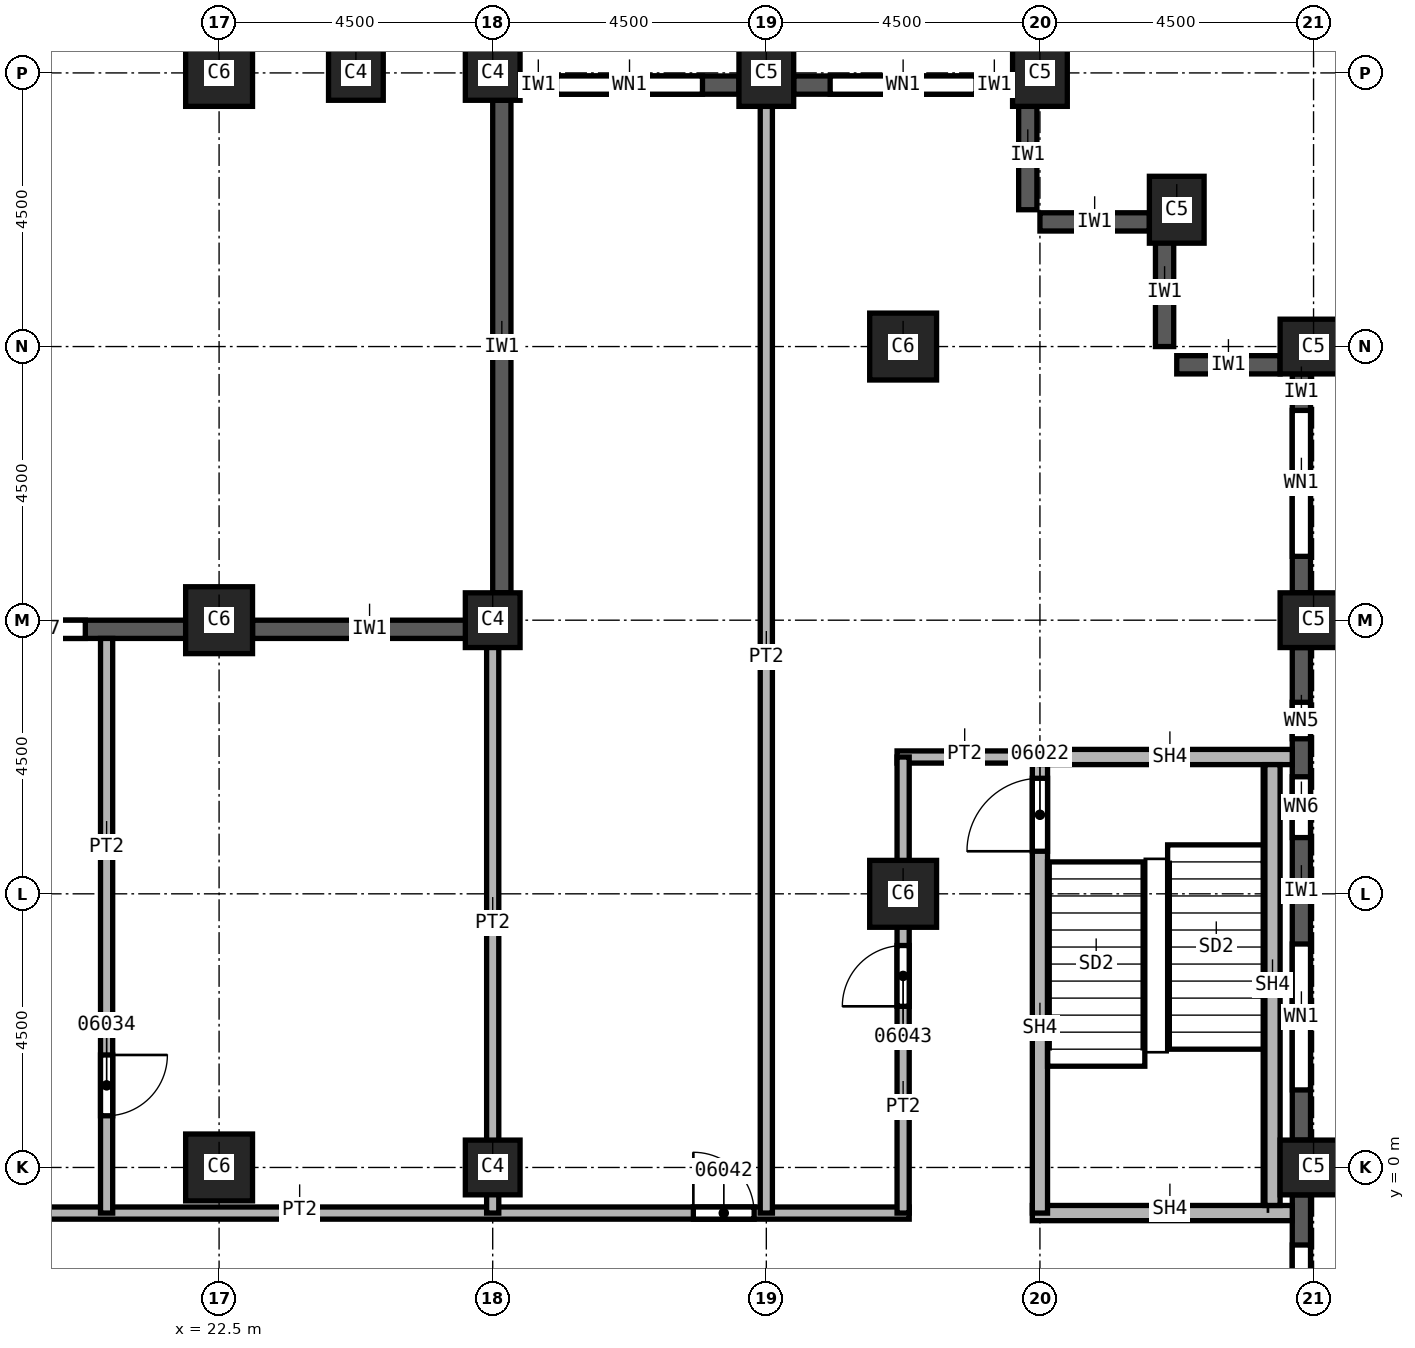
"""IFC4 building model, lengths in metres.
Left out: names, types, materials, properties, quantities, classifications, styles, units other than length and angle.
Written with IfcOpenShell. Run it as: python <this file> out.ifc"""

import sys

from ifc_helpers import new_model, si_unit, direction, frame, frame_2d, origin, origin_2d, place, context, subcontext, project, spatial, rectangle, extrude, element, fill, save


model = new_model("IFC4")
c1 = context("Model", 3, precision=1e-05, world=origin(), true_north=direction((0.0, 1.0)))
c2 = subcontext(c1, "Body", "Model", "MODEL_VIEW")
j1 = project(units=[si_unit("LENGTHUNIT", "METRE"), si_unit("PLANEANGLEUNIT", "RADIAN")], contexts=[c1])
p1 = place(None, origin())
s1 = spatial("IfcSite", under=j1, at=p1, CompositionType="ELEMENT")
p2 = place(p1, origin())
s2 = spatial("IfcBuilding", under=s1, at=p2, CompositionType="ELEMENT")
p3 = place(p2, frame((0.0, 0.0, 126.0)))
s3 = spatial("IfcBuildingStorey", under=s2, at=p3, CompositionType="ELEMENT", Elevation=126.0)
for number, where, z_axis, x_axis in (
    (1, (40.5, 0.0, 0.0), (0.0, 0.0, 1.0), (0.0, 1.0, 0.0)),
    (2, (40.5, 9.0, 0.0), (0.0, 0.0, 1.0), (0.0, 1.0, 0.0)),
    (3, (40.5, 13.5, 0.0), (0.0, 0.0, 1.0), (0.0, 1.0, 0.0)),
    (4, (38.25, 15.75, 0.0), (0.0, 0.0, 1.0), (1.0, 0.0, 0.0)),
    (5, (31.5, 18.0, 0.0), (0.0, 0.0, 1.0), (1.0, 0.0, 0.0)),
    (6, (36.0, 18.0, 0.0), (0.0, 0.0, 1.0), (1.0, 0.0, 0.0)),
):
    element("IfcColumn", number, at=place(p3, frame(where, z_axis=z_axis, x_axis=x_axis)), inside=s3, PredefinedType="COLUMN", context=c2, shape_type="SweptSolid", body=[
        extrude(rectangle(XDim=0.9, YDim=1.1, at=origin_2d()), origin(), (0.0, 0.0, 1.0), 3.7),
    ])
for number, where, z_axis, x_axis in (
    (7, (33.75, 4.5, 0.0), (0.0, 0.0, 1.0), (1.0, 0.0, 0.0)),
    (8, (33.75, 13.5, 0.0), (0.0, 0.0, 1.0), (1.0, 0.0, 0.0)),
    (9, (22.5, 0.0, 0.0), (0.0, 0.0, 1.0), (1.0, 0.0, 0.0)),
    (10, (22.5, 9.0, 0.0), (0.0, 0.0, 1.0), (1.0, 0.0, 0.0)),
    (11, (22.5, 18.0, 0.0), (0.0, 0.0, 1.0), (1.0, 0.0, 0.0)),
):
    element("IfcColumn", number, at=place(p3, frame(where, z_axis=z_axis, x_axis=x_axis)), inside=s3, PredefinedType="COLUMN", context=c2, shape_type="SweptSolid", body=[
        extrude(rectangle(XDim=1.1, YDim=1.1, at=origin_2d()), origin(), (0.0, 0.0, 1.0), 3.7),
    ])
for number, where, z_axis, x_axis in (
    (12, (27.0, 0.0, 0.0), (0.0, 0.0, 1.0), (1.0, 0.0, 0.0)),
    (13, (27.0, 9.0, 0.0), (0.0, 0.0, 1.0), (1.0, 0.0, 0.0)),
    (14, (27.0, 18.0, 0.0), (0.0, 0.0, 1.0), (1.0, 0.0, 0.0)),
    (15, (24.75, 18.0, 0.0), (0.0, 0.0, 1.0), (1.0, 0.0, 0.0)),
):
    element("IfcColumn", number, at=place(p3, frame(where, z_axis=z_axis, x_axis=x_axis)), inside=s3, PredefinedType="COLUMN", context=c2, shape_type="SweptSolid", body=[
        extrude(rectangle(XDim=0.9, YDim=0.9, at=origin_2d()), origin(), (0.0, 0.0, 1.0), 3.7),
    ])
p4 = place(p3, frame((39.95, 13.2, 0.0), z_axis=(0.0, 0.0, 1.0), x_axis=(-1.0, 0.0, 0.0)))
e16 = element("IfcWall", 16, at=p4, inside=s3, PredefinedType="SOLIDWALL", context=c2, shape_type="SweptSolid", body=[
    extrude(rectangle(XDim=1.7, YDim=0.3, at=frame_2d((0.85, 0.0))), origin(), (0.0, 0.0, 1.0), 3.1),
])
for number, where, z_axis, x_axis in (
    (17, (38.05, 15.3, 0.0), (0.0, 0.0, 1.0), (0.0, -1.0, 0.0)),
    (18, (37.8, 15.55, 0.0), (0.0, 0.0, 1.0), (-1.0, 0.0, 0.0)),
    (19, (35.8, 17.55, 0.0), (0.0, 0.0, 1.0), (0.0, -1.0, 0.0)),
):
    element("IfcWall", number, at=place(p3, frame(where, z_axis=z_axis, x_axis=x_axis)), inside=s3, PredefinedType="SOLIDWALL", context=c2, shape_type="SweptSolid", body=[
        extrude(rectangle(XDim=1.8, YDim=0.3, at=frame_2d((0.9, 0.0))), origin(), (0.0, 0.0, 1.0), 3.1),
    ])
p5 = place(p3, frame((40.3, -8.55, 0.0), z_axis=(0.0, 0.0, 1.0), x_axis=(0.0, 1.0, 0.0)))
e20 = element("IfcWall", 20, at=p5, inside=s3, PredefinedType="SOLIDWALL", context=c2, shape_type="SweptSolid", body=[
    extrude(rectangle(XDim=8.1, YDim=0.3, at=frame_2d((4.05, 0.0))), origin(), (0.0, 0.0, 1.0), 3.1),
])
p6 = place(p5, frame((0.825, 0.0, 0.8)))
e21 = element("IfcOpeningElement", 21, at=p6, cuts=e20, PredefinedType="OPENING", context=c2, shape_type="SweptSolid", body=[
    extrude(rectangle(XDim=2.4, YDim=1.95, at=frame_2d((1.2, 0.975))), frame((0.0, 0.15, 0.0), z_axis=(0.0, -1.0, 0.0), x_axis=(1.0, 0.0, 0.0)), (0.0, 0.0, 1.0), 0.3),
])
p7 = place(p5, frame((4.875, 0.0, 0.8)))
e22 = element("IfcOpeningElement", 22, at=p7, cuts=e20, PredefinedType="OPENING", context=c2, shape_type="SweptSolid", body=[
    extrude(rectangle(XDim=2.4, YDim=1.95, at=frame_2d((1.2, 0.975))), frame((0.0, 0.15, 0.0), z_axis=(0.0, -1.0, 0.0), x_axis=(1.0, 0.0, 0.0)), (0.0, 0.0, 1.0), 0.3),
])
p8 = place(p3, frame((40.3, 0.45, 0.0), z_axis=(0.0, 0.0, 1.0), x_axis=(0.0, 1.0, 0.0)))
e23 = element("IfcWall", 23, at=p8, inside=s3, PredefinedType="SOLIDWALL", context=c2, shape_type="SweptSolid", body=[
    extrude(rectangle(XDim=8.1, YDim=0.3, at=frame_2d((4.05, 0.0))), origin(), (0.0, 0.0, 1.0), 3.1),
])
p9 = place(p8, frame((0.825, 0.0, 0.8)))
e24 = element("IfcOpeningElement", 24, at=p9, cuts=e23, PredefinedType="OPENING", context=c2, shape_type="SweptSolid", body=[
    extrude(rectangle(XDim=2.4, YDim=1.95, at=frame_2d((1.2, 0.975))), frame((0.0, 0.15, 0.0), z_axis=(0.0, -1.0, 0.0), x_axis=(1.0, 0.0, 0.0)), (0.0, 0.0, 1.0), 0.3),
])
p10 = place(p8, frame((4.975, 0.0, 0.8)))
e25 = element("IfcOpeningElement", 25, at=p10, cuts=e23, PredefinedType="OPENING", context=c2, shape_type="SweptSolid", body=[
    extrude(rectangle(XDim=1.0, YDim=1.95, at=frame_2d((0.5, 0.975))), frame((0.0, 0.15, 0.0), z_axis=(0.0, -1.0, 0.0), x_axis=(1.0, 0.0, 0.0)), (0.0, 0.0, 1.0), 0.3),
])
p11 = place(p8, frame((6.6, 0.0, 0.8)))
e26 = element("IfcOpeningElement", 26, at=p11, cuts=e23, PredefinedType="OPENING", context=c2, shape_type="SweptSolid", body=[
    extrude(rectangle(XDim=0.6, YDim=1.95, at=frame_2d((0.3, 0.975))), frame((0.0, 0.15, 0.0), z_axis=(0.0, -1.0, 0.0), x_axis=(1.0, 0.0, 0.0)), (0.0, 0.0, 1.0), 0.3),
])
p12 = place(p3, frame((40.3, 9.45, 0.0), z_axis=(0.0, 0.0, 1.0), x_axis=(0.0, 1.0, 0.0)))
e27 = element("IfcWall", 27, at=p12, inside=s3, PredefinedType="SOLIDWALL", context=c2, shape_type="SweptSolid", body=[
    extrude(rectangle(XDim=3.6, YDim=0.3, at=frame_2d((1.8, 0.0))), origin(), (0.0, 0.0, 1.0), 3.1),
])
p13 = place(p12, frame((0.6, 0.0, 0.8)))
e28 = element("IfcOpeningElement", 28, at=p13, cuts=e27, PredefinedType="OPENING", context=c2, shape_type="SweptSolid", body=[
    extrude(rectangle(XDim=2.4, YDim=1.95, at=frame_2d((1.2, 0.975))), frame((0.0, 0.15, 0.0), z_axis=(0.0, -1.0, 0.0), x_axis=(1.0, 0.0, 0.0)), (0.0, 0.0, 1.0), 0.3),
])
p14 = place(p3, frame((35.55, 17.8, 0.0), z_axis=(0.0, 0.0, 1.0), x_axis=(-1.0, 0.0, 0.0)))
e29 = element("IfcWall", 29, at=p14, inside=s3, PredefinedType="SOLIDWALL", context=c2, shape_type="SweptSolid", body=[
    extrude(rectangle(XDim=3.6, YDim=0.3, at=frame_2d((1.8, 0.0))), origin(), (0.0, 0.0, 1.0), 3.1),
])
p15 = place(p14, frame((0.6, 0.0, 0.8)))
e30 = element("IfcOpeningElement", 30, at=p15, cuts=e29, PredefinedType="OPENING", context=c2, shape_type="SweptSolid", body=[
    extrude(rectangle(XDim=2.4, YDim=1.95, at=frame_2d((1.2, 0.975))), frame((0.0, 0.15, 0.0), z_axis=(0.0, -1.0, 0.0), x_axis=(1.0, 0.0, 0.0)), (0.0, 0.0, 1.0), 0.3),
])
p16 = place(p3, frame((31.05, 17.8, 0.0), z_axis=(0.0, 0.0, 1.0), x_axis=(-1.0, 0.0, 0.0)))
e31 = element("IfcWall", 31, at=p16, inside=s3, PredefinedType="SOLIDWALL", context=c2, shape_type="SweptSolid", body=[
    extrude(rectangle(XDim=3.6, YDim=0.3, at=frame_2d((1.8, 0.0))), origin(), (0.0, 0.0, 1.0), 3.1),
])
p17 = place(p16, frame((0.6, 0.0, 0.8)))
e32 = element("IfcOpeningElement", 32, at=p17, cuts=e31, PredefinedType="OPENING", context=c2, shape_type="SweptSolid", body=[
    extrude(rectangle(XDim=2.4, YDim=1.95, at=frame_2d((1.2, 0.975))), frame((0.0, 0.15, 0.0), z_axis=(0.0, -1.0, 0.0), x_axis=(1.0, 0.0, 0.0)), (0.0, 0.0, 1.0), 0.3),
])
p18 = place(p3, frame((21.95, 8.85, 0.0), z_axis=(0.0, 0.0, 1.0), x_axis=(-1.0, 0.0, 0.0)))
e33 = element("IfcWall", 33, at=p18, inside=s3, PredefinedType="SOLIDWALL", context=c2, shape_type="SweptSolid", body=[
    extrude(rectangle(XDim=8.4, YDim=0.3, at=frame_2d((4.2, 0.0))), origin(), (0.0, 0.0, 1.0), 3.1),
])
p19 = place(p18, frame((1.65, 0.0, 0.8)))
e34 = element("IfcOpeningElement", 34, at=p19, cuts=e33, PredefinedType="OPENING", context=c2, shape_type="SweptSolid", body=[
    extrude(rectangle(XDim=1.4, YDim=1.95, at=frame_2d((0.7, 0.975))), frame((0.0, 0.15, 0.0), z_axis=(0.0, -1.0, 0.0), x_axis=(1.0, 0.0, 0.0)), (0.0, 0.0, 1.0), 0.3),
])
p20 = place(p18, frame((4.875, 0.0, 0.8)))
e35 = element("IfcOpeningElement", 35, at=p20, cuts=e33, PredefinedType="OPENING", context=c2, shape_type="SweptSolid", body=[
    extrude(rectangle(XDim=1.4, YDim=1.95, at=frame_2d((0.7, 0.975))), frame((0.0, 0.15, 0.0), z_axis=(0.0, -1.0, 0.0), x_axis=(1.0, 0.0, 0.0)), (0.0, 0.0, 1.0), 0.3),
])
p21 = place(p3, frame((26.95, 8.85, 0.0), z_axis=(0.0, 0.0, 1.0), x_axis=(-1.0, 0.0, 0.0)))
e36 = element("IfcWall", 36, at=p21, inside=s3, PredefinedType="SOLIDWALL", context=c2, shape_type="SweptSolid", body=[
    extrude(rectangle(XDim=3.9, YDim=0.3, at=frame_2d((1.95, 0.0))), origin(), (0.0, 0.0, 1.0), 3.1),
])
p22 = place(p3, frame((15.4, -0.75, 0.0), z_axis=(0.0, 0.0, 1.0), x_axis=(1.0, 0.0, 0.0)))
e37 = element("IfcWall", 37, at=p22, inside=s3, PredefinedType="PARTITIONING", context=c2, shape_type="SweptSolid", body=[
    extrude(rectangle(XDim=18.45, YDim=0.2, at=frame_2d((9.225, 0.0))), origin(), (0.0, 0.0, 1.0), 3.7),
])
p23 = place(p22, frame((14.9, 0.0, 0.0)))
e38 = element("IfcOpeningElement", 38, at=p23, cuts=e37, PredefinedType="OPENING", context=c2, shape_type="SweptSolid", body=[
    extrude(rectangle(XDim=1.0, YDim=2.1, at=frame_2d((0.5, 1.05))), frame((0.0, 0.1, 0.0), z_axis=(0.0, -1.0, 0.0), x_axis=(1.0, 0.0, 0.0)), (0.0, 0.0, 1.0), 0.2),
])
p24 = place(p3, frame((20.65, 8.7, 0.0), z_axis=(0.0, 0.0, 1.0), x_axis=(0.0, -1.0, 0.0)))
e39 = element("IfcWall", 39, at=p24, inside=s3, PredefinedType="PARTITIONING", context=c2, shape_type="SweptSolid", body=[
    extrude(rectangle(XDim=9.45, YDim=0.2, at=frame_2d((4.725, 0.0))), origin(), (0.0, 0.0, 1.0), 3.7),
])
p25 = place(p24, frame((6.85, 0.0, 0.0)))
e40 = element("IfcOpeningElement", 40, at=p25, cuts=e39, PredefinedType="OPENING", context=c2, shape_type="SweptSolid", body=[
    extrude(rectangle(XDim=1.0, YDim=2.1, at=frame_2d((0.5, 1.05))), frame((0.0, 0.1, 0.0), z_axis=(0.0, -1.0, 0.0), x_axis=(1.0, 0.0, 0.0)), (0.0, 0.0, 1.0), 0.2),
])
p26 = place(p3, frame((27.0, 9.0, 0.0), z_axis=(0.0, 0.0, 1.0), x_axis=(0.0, -1.0, 0.0)))
e41 = element("IfcWall", 41, at=p26, inside=s3, PredefinedType="PARTITIONING", context=c2, shape_type="SweptSolid", body=[
    extrude(rectangle(XDim=9.75, YDim=0.2, at=frame_2d((4.875, 0.0))), origin(), (0.0, 0.0, 1.0), 3.7),
])
p27 = place(p3, frame((31.5, 17.45, 0.0), z_axis=(0.0, 0.0, 1.0), x_axis=(0.0, -1.0, 0.0)))
e42 = element("IfcWall", 42, at=p27, inside=s3, PredefinedType="PARTITIONING", context=c2, shape_type="SweptSolid", body=[
    extrude(rectangle(XDim=18.2, YDim=0.2, at=frame_2d((9.1, 0.0))), origin(), (0.0, 0.0, 1.0), 3.7),
])
p28 = place(p3, frame((33.65, 6.75, 0.0), z_axis=(0.0, 0.0, 1.0), x_axis=(1.0, 0.0, 0.0)))
e43 = element("IfcWall", 43, at=p28, inside=s3, PredefinedType="PARTITIONING", context=c2, shape_type="SweptSolid", body=[
    extrude(rectangle(XDim=2.35, YDim=0.2, at=frame_2d((1.175, 0.0))), origin(), (0.0, 0.0, 1.0), 3.7),
])
p29 = place(p3, frame((33.75, -0.75, 0.0), z_axis=(0.0, 0.0, 1.0), x_axis=(0.0, 1.0, 0.0)))
e44 = element("IfcWall", 44, at=p29, inside=s3, PredefinedType="PARTITIONING", context=c2, shape_type="SweptSolid", body=[
    extrude(rectangle(XDim=7.5, YDim=0.2, at=frame_2d((3.75, 0.0))), origin(), (0.0, 0.0, 1.0), 3.7),
])
p30 = place(p29, frame((3.4, 0.0, 0.0)))
e45 = element("IfcOpeningElement", 45, at=p30, cuts=e44, PredefinedType="OPENING", context=c2, shape_type="SweptSolid", body=[
    extrude(rectangle(XDim=1.0, YDim=2.1, at=frame_2d((0.5, 1.05))), frame((0.0, 0.1, 0.0), z_axis=(0.0, -1.0, 0.0), x_axis=(1.0, 0.0, 0.0)), (0.0, 0.0, 1.0), 0.2),
])
p31 = place(p3, frame((35.875, -0.75, 0.0), z_axis=(0.0, 0.0, 1.0), x_axis=(1.0, 0.0, 0.0)))
e46 = element("IfcWall", 46, at=p31, inside=s3, PredefinedType="SOLIDWALL", context=c2, shape_type="SweptSolid", body=[
    extrude(rectangle(XDim=4.275, YDim=0.25, at=frame_2d((2.137, 0.0))), origin(), (0.0, 0.0, 1.0), 3.7),
])
p32 = place(p3, frame((36.0, -0.75, 0.0), z_axis=(0.0, 0.0, 1.0), x_axis=(0.0, 1.0, 0.0)))
e47 = element("IfcWall", 47, at=p32, inside=s3, PredefinedType="SOLIDWALL", context=c2, shape_type="SweptSolid", body=[
    extrude(rectangle(XDim=7.625, YDim=0.25, at=frame_2d((3.812, 0.0))), origin(), (0.0, 0.0, 1.0), 3.7),
])
p33 = place(p32, frame((5.95, 0.0, 0.0)))
e48 = element("IfcOpeningElement", 48, at=p33, cuts=e47, PredefinedType="OPENING", context=c2, shape_type="SweptSolid", body=[
    extrude(rectangle(XDim=1.2, YDim=2.1, at=frame_2d((0.6, 1.05))), frame((0.0, 0.125, 0.0), z_axis=(0.0, -1.0, 0.0), x_axis=(1.0, 0.0, 0.0)), (0.0, 0.0, 1.0), 0.25),
])
p34 = place(p3, frame((36.0, 6.75, 0.0), z_axis=(0.0, 0.0, 1.0), x_axis=(1.0, 0.0, 0.0)))
e49 = element("IfcWall", 49, at=p34, inside=s3, PredefinedType="SOLIDWALL", context=c2, shape_type="SweptSolid", body=[
    extrude(rectangle(XDim=4.15, YDim=0.25, at=frame_2d((2.075, 0.0))), origin(), (0.0, 0.0, 1.0), 3.7),
])
p35 = place(p3, frame((39.825, -0.625, 0.0), z_axis=(0.0, 0.0, 1.0), x_axis=(0.0, 1.0, 0.0)))
e50 = element("IfcWall", 50, at=p35, inside=s3, PredefinedType="SOLIDWALL", context=c2, shape_type="SweptSolid", body=[
    extrude(rectangle(XDim=7.25, YDim=0.25, at=frame_2d((3.625, 0.0))), origin(), (0.0, 0.0, 1.0), 3.7),
])
p36 = place(p3, frame((27.15, 9.45, 0.0), z_axis=(0.0, 0.0, 1.0), x_axis=(0.0, 1.0, 0.0)))
e51 = element("IfcWall", 51, at=p36, inside=s3, PredefinedType="SOLIDWALL", context=c2, shape_type="SweptSolid", body=[
    extrude(rectangle(XDim=8.1, YDim=0.3, at=frame_2d((4.05, 0.0))), origin(), (0.0, 0.0, 1.0), 3.1),
])
p37 = place(p7, origin())
e52 = element("IfcWindow", 52, at=p37, inside=s3, PartitioningType="SINGLE_PANEL", PredefinedType="WINDOW", context=c2, shape_type="SweptSolid", body=[
    extrude(rectangle(XDim=2.4, YDim=1.95, at=frame_2d((1.2, 0.975))), frame((0.0, 0.03, 0.0), z_axis=(0.0, -1.0, 0.0), x_axis=(1.0, 0.0, 0.0)), (0.0, 0.0, 1.0), 0.06),
])
fill(e22, e52)
p38 = place(p9, origin())
e53 = element("IfcWindow", 53, at=p38, inside=s3, PartitioningType="SINGLE_PANEL", PredefinedType="WINDOW", context=c2, shape_type="SweptSolid", body=[
    extrude(rectangle(XDim=2.4, YDim=1.95, at=frame_2d((1.2, 0.975))), frame((0.0, 0.03, 0.0), z_axis=(0.0, -1.0, 0.0), x_axis=(1.0, 0.0, 0.0)), (0.0, 0.0, 1.0), 0.06),
])
fill(e24, e53)
p39 = place(p13, origin())
e54 = element("IfcWindow", 54, at=p39, inside=s3, PartitioningType="SINGLE_PANEL", PredefinedType="WINDOW", context=c2, shape_type="SweptSolid", body=[
    extrude(rectangle(XDim=2.4, YDim=1.95, at=frame_2d((1.2, 0.975))), frame((0.0, 0.03, 0.0), z_axis=(0.0, -1.0, 0.0), x_axis=(1.0, 0.0, 0.0)), (0.0, 0.0, 1.0), 0.06),
])
fill(e28, e54)
p40 = place(p15, origin())
e55 = element("IfcWindow", 55, at=p40, inside=s3, PartitioningType="SINGLE_PANEL", PredefinedType="WINDOW", context=c2, shape_type="SweptSolid", body=[
    extrude(rectangle(XDim=2.4, YDim=1.95, at=frame_2d((1.2, 0.975))), frame((0.0, 0.03, 0.0), z_axis=(0.0, -1.0, 0.0), x_axis=(1.0, 0.0, 0.0)), (0.0, 0.0, 1.0), 0.06),
])
fill(e30, e55)
p41 = place(p17, origin())
e56 = element("IfcWindow", 56, at=p41, inside=s3, PartitioningType="SINGLE_PANEL", PredefinedType="WINDOW", context=c2, shape_type="SweptSolid", body=[
    extrude(rectangle(XDim=2.4, YDim=1.95, at=frame_2d((1.2, 0.975))), frame((0.0, 0.03, 0.0), z_axis=(0.0, -1.0, 0.0), x_axis=(1.0, 0.0, 0.0)), (0.0, 0.0, 1.0), 0.06),
])
fill(e32, e56)
p42 = place(p33, origin())
e57 = element("IfcDoor", 57, at=p42, inside=s3, OperationType="SINGLE_SWING_LEFT", PredefinedType="DOOR", context=c2, shape_type="SweptSolid", body=[
    extrude(rectangle(XDim=1.2, YDim=2.1, at=frame_2d((0.6, 1.05))), frame((0.0, 0.025, 0.0), z_axis=(0.0, -1.0, 0.0), x_axis=(1.0, 0.0, 0.0)), (0.0, 0.0, 1.0), 0.05),
])
fill(e48, e57)
p43 = place(p25, origin())
e58 = element("IfcDoor", 58, at=p43, inside=s3, OperationType="SINGLE_SWING_LEFT", PredefinedType="DOOR", context=c2, shape_type="SweptSolid", body=[
    extrude(rectangle(XDim=1.0, YDim=2.1, at=frame_2d((0.5, 1.05))), frame((0.0, 0.025, 0.0), z_axis=(0.0, -1.0, 0.0), x_axis=(1.0, 0.0, 0.0)), (0.0, 0.0, 1.0), 0.05),
])
fill(e40, e58)
p44 = place(p23, origin())
e59 = element("IfcDoor", 59, at=p44, inside=s3, OperationType="SINGLE_SWING_LEFT", PredefinedType="DOOR", context=c2, shape_type="SweptSolid", body=[
    extrude(rectangle(XDim=1.0, YDim=2.1, at=frame_2d((0.5, 1.05))), frame((0.0, 0.025, 0.0), z_axis=(0.0, -1.0, 0.0), x_axis=(1.0, 0.0, 0.0)), (0.0, 0.0, 1.0), 0.05),
])
fill(e38, e59)
p45 = place(p30, origin())
e60 = element("IfcDoor", 60, at=p45, inside=s3, OperationType="SINGLE_SWING_RIGHT", PredefinedType="DOOR", context=c2, shape_type="SweptSolid", body=[
    extrude(rectangle(XDim=1.0, YDim=2.1, at=frame_2d((0.5, 1.05))), frame((0.0, 0.025, 0.0), z_axis=(0.0, -1.0, 0.0), x_axis=(1.0, 0.0, 0.0)), (0.0, 0.0, 1.0), 0.05),
])
fill(e45, e60)
p46 = place(p10, origin())
e61 = element("IfcWindow", 61, at=p46, inside=s3, PartitioningType="SINGLE_PANEL", PredefinedType="WINDOW", context=c2, shape_type="SweptSolid", body=[
    extrude(rectangle(XDim=1.0, YDim=1.95, at=frame_2d((0.5, 0.975))), frame((0.0, 0.03, 0.0), z_axis=(0.0, -1.0, 0.0), x_axis=(1.0, 0.0, 0.0)), (0.0, 0.0, 1.0), 0.06),
])
fill(e25, e61)
p47 = place(p11, origin())
e62 = element("IfcWindow", 62, at=p47, inside=s3, PartitioningType="SINGLE_PANEL", PredefinedType="WINDOW", context=c2, shape_type="SweptSolid", body=[
    extrude(rectangle(XDim=0.6, YDim=1.95, at=frame_2d((0.3, 0.975))), frame((0.0, 0.03, 0.0), z_axis=(0.0, -1.0, 0.0), x_axis=(1.0, 0.0, 0.0)), (0.0, 0.0, 1.0), 0.06),
])
fill(e26, e62)
p48 = place(p19, origin())
e63 = element("IfcWindow", 63, at=p48, inside=s3, PartitioningType="SINGLE_PANEL", PredefinedType="WINDOW", context=c2, shape_type="SweptSolid", body=[
    extrude(rectangle(XDim=1.4, YDim=1.95, at=frame_2d((0.7, 0.975))), frame((0.0, 0.03, 0.0), z_axis=(0.0, -1.0, 0.0), x_axis=(1.0, 0.0, 0.0)), (0.0, 0.0, 1.0), 0.06),
])
fill(e34, e63)
save(model, sys.argv[1])
